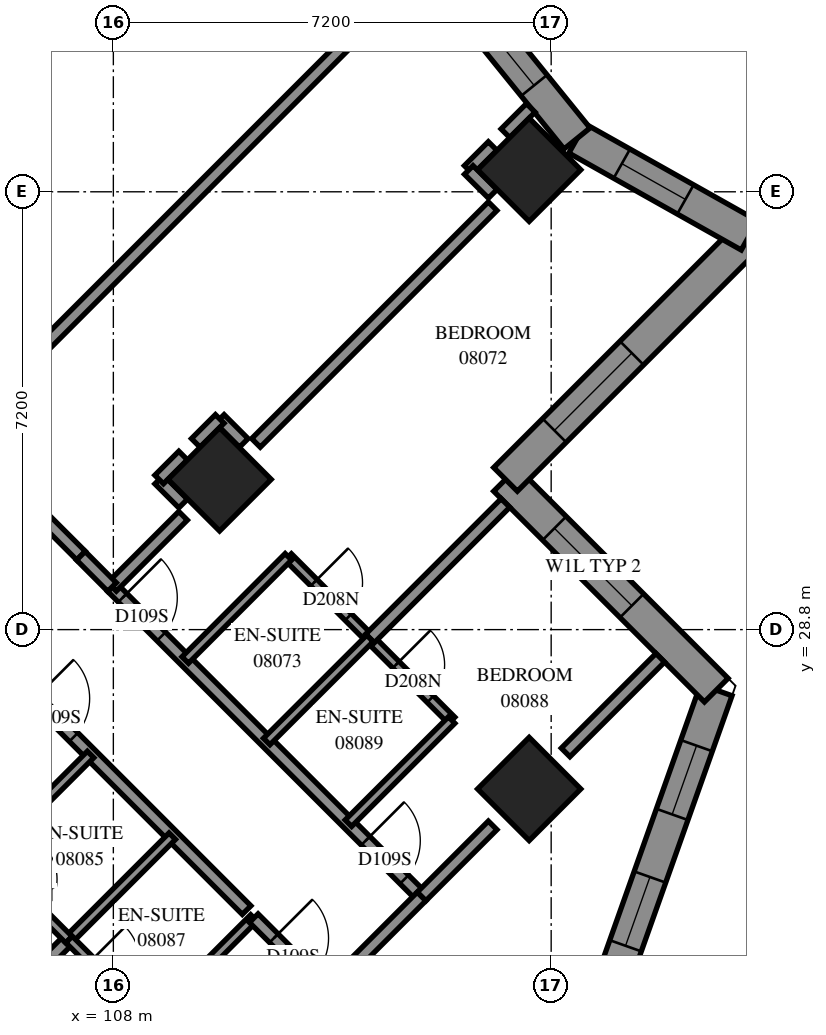
"""IFC4 building model, lengths in metres.
Left out: names, types, materials, properties, quantities, classifications, styles, units other than length and angle.
Written with IfcOpenShell. Run it as: python <this file> out.ifc"""

import sys

from ifc_helpers import new_model, si_unit, direction, frame, frame_2d, origin, origin_2d, place, context, subcontext, project, spatial, polyline, rectangle, outline, extrude, element, fill, save


model = new_model("IFC4")
c1 = context("Model", 3, precision=1e-05, world=origin(), true_north=direction((0.0, 1.0)))
c2 = subcontext(c1, "Body", "Model", "MODEL_VIEW")
j1 = project(units=[si_unit("LENGTHUNIT", "METRE"), si_unit("PLANEANGLEUNIT", "RADIAN")], contexts=[c1])
p1 = place(None, origin())
s1 = spatial("IfcSite", under=j1, at=p1, CompositionType="ELEMENT")
p2 = place(p1, origin())
s2 = spatial("IfcBuilding", under=s1, at=p2, CompositionType="ELEMENT")
p3 = place(p2, frame((0.0, 0.0, 33.8)))
s3 = spatial("IfcBuildingStorey", under=s2, at=p3, CompositionType="ELEMENT", Elevation=33.8)
for number, where, z_axis, x_axis in (
    (1, (114.838, 36.362, 0.0), (0.0, 0.0, 1.0), (0.707, -0.707, 0.0)),
    (2, (109.747, 31.271, 0.0), (0.0, 0.0, 1.0), (0.707, -0.707, 0.0)),
    (3, (114.838, 26.18, 0.0), (0.0, 0.0, 1.0), (0.707, -0.707, 0.0)),
):
    element("IfcColumn", number, at=place(p3, frame(where, z_axis=z_axis, x_axis=x_axis)), inside=s3, PredefinedType="COLUMN", context=c2, shape_type="SweptSolid", body=[
        extrude(rectangle(XDim=1.2, YDim=1.2, at=origin_2d()), origin(), (0.0, 0.0, 1.0), 3.1),
    ])
p4 = place(p3, frame((116.148, 22.826, 0.0), z_axis=(0.0, 0.0, 1.0), x_axis=(0.3344412968, 0.9424165846, 0.0)))
e4 = element("IfcWall", 4, at=p4, inside=s3, PredefinedType="SOLIDWALL", context=c2, shape_type="SweptSolid", body=[
    extrude(outline(polyline([(-0.125, -0.275), (5.457, -0.275), (5.11, 0.275), (0.125, 0.275), (-0.125, -0.275)])), origin(), (0.0, 0.0, 1.0), 3.1),
])
p5 = place(p4, frame((0.822, 0.0, 0.5)))
e5 = element("IfcOpeningElement", 5, at=p5, cuts=e4, PredefinedType="OPENING", context=c2, shape_type="SweptSolid", body=[
    extrude(rectangle(XDim=1.2, YDim=2.45, at=frame_2d((0.6, 1.225))), frame((0.0, 0.285, 0.0), z_axis=(0.0, -1.0, 0.0), x_axis=(1.0, 0.0, 0.0)), (0.0, 0.0, 1.0), 0.57),
])
p6 = place(p4, frame((3.115, 0.0, 0.5)))
e6 = element("IfcOpeningElement", 6, at=p6, cuts=e4, PredefinedType="OPENING", context=c2, shape_type="SweptSolid", body=[
    extrude(rectangle(XDim=1.2, YDim=2.45, at=frame_2d((0.6, 1.225))), frame((0.0, 0.285, 0.0), z_axis=(0.0, -1.0, 0.0), x_axis=(1.0, 0.0, 0.0)), (0.0, 0.0, 1.0), 0.57),
])
p7 = place(p3, frame((117.915, 27.805, 0.0), z_axis=(0.0, 0.0, 1.0), x_axis=(-0.7071067812, 0.7071067812, 0.0)))
e7 = element("IfcWall", 7, at=p7, inside=s3, PredefinedType="SOLIDWALL", context=c2, shape_type="SweptSolid", body=[
    extrude(outline(polyline([(-0.174, -0.275), (4.626, -0.275), (5.176, 0.275), (0.174, 0.275), (-0.174, -0.275)])), origin(), (0.0, 0.0, 1.0), 3.1),
])
p8 = place(p7, frame((1.964, 0.0, 0.6)))
e8 = element("IfcOpeningElement", 8, at=p8, cuts=e7, PredefinedType="OPENING", context=c2, shape_type="SweptSolid", body=[
    extrude(rectangle(XDim=1.8, YDim=1.9, at=frame_2d((0.9, 0.95))), frame((0.0, 0.285, 0.0), z_axis=(0.0, -1.0, 0.0), x_axis=(1.0, 0.0, 0.0)), (0.0, 0.0, 1.0), 0.57),
])
p9 = place(p3, frame((114.449, 31.271, 0.0), z_axis=(0.0, 0.0, 1.0), x_axis=(0.7070979682, 0.7071155941, 0.0)))
e9 = element("IfcWall", 9, at=p9, inside=s3, PredefinedType="SOLIDWALL", context=c2, shape_type="SweptSolid", body=[
    extrude(outline(polyline([(0.275, -0.275), (6.036, -0.275), (5.311, 0.275), (-0.275, 0.275), (0.275, -0.275)])), origin(), (0.0, 0.0, 1.0), 3.1),
])
p10 = place(p9, frame((1.137, 0.0, 0.6)))
e10 = element("IfcOpeningElement", 10, at=p10, cuts=e9, PredefinedType="OPENING", context=c2, shape_type="SweptSolid", body=[
    extrude(rectangle(XDim=1.8, YDim=1.9, at=frame_2d((0.9, 0.95))), frame((0.0, 0.285, 0.0), z_axis=(0.0, -1.0, 0.0), x_axis=(1.0, 0.0, 0.0)), (0.0, 0.0, 1.0), 0.57),
])
p11 = place(p3, frame((118.461, 35.282, 0.0), z_axis=(0.0, 0.0, 1.0), x_axis=(-0.8716297162, 0.4901649088, 0.0)))
e11 = element("IfcWall", 11, at=p11, inside=s3, PredefinedType="SOLIDWALL", context=c2, shape_type="SweptSolid", body=[
    extrude(outline(polyline([(-0.363, -0.275), (3.2, -0.275), (3.306, 0.275), (0.363, 0.275), (-0.363, -0.275)])), origin(), (0.0, 0.0, 1.0), 3.1),
])
p12 = place(p11, frame((1.208, 0.0, 0.5)))
e12 = element("IfcOpeningElement", 12, at=p12, cuts=e11, PredefinedType="OPENING", context=c2, shape_type="SweptSolid", body=[
    extrude(rectangle(XDim=1.2, YDim=2.45, at=frame_2d((0.6, 1.225))), frame((0.0, 0.285, 0.0), z_axis=(0.0, -1.0, 0.0), x_axis=(1.0, 0.0, 0.0)), (0.0, 0.0, 1.0), 0.57),
])
p13 = place(p3, frame((115.626, 36.877, 0.0), z_axis=(0.0, 0.0, 1.0), x_axis=(-0.6292379801, 0.7772126893, 0.0)))
e13 = element("IfcWall", 13, at=p13, inside=s3, PredefinedType="SOLIDWALL", context=c2, shape_type="SweptSolid", body=[
    extrude(outline(polyline([(0.053, -0.275), (3.502, -0.275), (3.445, 0.275), (-0.053, 0.275), (0.053, -0.275)])), origin(), (0.0, 0.0, 1.0), 3.1),
])
p14 = place(p13, frame((1.122, 0.0, 0.5)))
e14 = element("IfcOpeningElement", 14, at=p14, cuts=e13, PredefinedType="OPENING", context=c2, shape_type="SweptSolid", body=[
    extrude(rectangle(XDim=1.2, YDim=2.45, at=frame_2d((0.6, 1.225))), frame((0.0, 0.285, 0.0), z_axis=(0.0, -1.0, 0.0), x_axis=(1.0, 0.0, 0.0)), (0.0, 0.0, 1.0), 0.57),
])
p15 = place(p3, frame((102.609, 31.769, 0.0), z_axis=(0.0, 0.0, 1.0), x_axis=(0.7071067812, -0.7071067812, 0.0)))
e15 = element("IfcWall", 15, at=p15, inside=s3, PredefinedType="PARTITIONING", context=c2, shape_type="SweptSolid", body=[
    extrude(rectangle(XDim=10.723, YDim=0.2, at=frame_2d((5.361, 0.0))), origin(), (0.0, 0.0, 1.0), 3.1),
])
p16 = place(p15, frame((4.15, 0.0, 0.0)))
e16 = element("IfcOpeningElement", 16, at=p16, cuts=e15, PredefinedType="OPENING", context=c2, shape_type="SweptSolid", body=[
    extrude(rectangle(XDim=0.9, YDim=2.1, at=frame_2d((0.45, 1.05))), frame((0.0, 0.11, 0.0), z_axis=(0.0, -1.0, 0.0), x_axis=(1.0, 0.0, 0.0)), (0.0, 0.0, 1.0), 0.22),
])
p17 = place(p15, frame((5.8, 0.0, 0.0)))
e17 = element("IfcOpeningElement", 17, at=p17, cuts=e15, PredefinedType="OPENING", context=c2, shape_type="SweptSolid", body=[
    extrude(rectangle(XDim=0.9, YDim=2.1, at=frame_2d((0.45, 1.05))), frame((0.0, 0.11, 0.0), z_axis=(0.0, -1.0, 0.0), x_axis=(1.0, 0.0, 0.0)), (0.0, 0.0, 1.0), 0.22),
])
p18 = place(p3, frame((105.437, 32.045, 0.0), z_axis=(0.0, 0.0, 1.0), x_axis=(0.70701308, 0.70720047, 0.0)))
e18 = element("IfcWall", 18, at=p18, inside=s3, PredefinedType="PARTITIONING", context=c2, shape_type="SweptSolid", body=[
    extrude(rectangle(XDim=10.673, YDim=0.2, at=frame_2d((5.337, 0.0))), origin(), (0.0, 0.0, 1.0), 3.1),
])
p19 = place(p3, frame((101.587, 18.028, 0.0), z_axis=(0.0, 0.0, 1.0), x_axis=(0.7072374716, 0.7069760666, 0.0)))
e19 = element("IfcWall", 19, at=p19, inside=s3, PredefinedType="PARTITIONING", context=c2, shape_type="SweptSolid", body=[
    extrude(rectangle(XDim=8.034, YDim=0.2, at=frame_2d((4.017, 0.0))), origin(), (0.0, 0.0, 1.0), 3.1),
])
p20 = place(p3, frame((107.977, 29.499, 0.0), z_axis=(0.0, 0.0, 1.0), x_axis=(0.7071067812, -0.7071067812, 0.0)))
e20 = element("IfcWall", 20, at=p20, inside=s3, PredefinedType="PARTITIONING", context=c2, shape_type="SweptSolid", body=[
    extrude(rectangle(XDim=7.198, YDim=0.2, at=frame_2d((3.599, 0.0))), origin(), (0.0, 0.0, 1.0), 3.1),
])
p21 = place(p20, frame((0.247, 0.0, 0.0)))
e21 = element("IfcOpeningElement", 21, at=p21, cuts=e20, PredefinedType="OPENING", context=c2, shape_type="SweptSolid", body=[
    extrude(rectangle(XDim=0.9, YDim=2.1, at=frame_2d((0.45, 1.05))), frame((0.0, 0.11, 0.0), z_axis=(0.0, -1.0, 0.0), x_axis=(1.0, 0.0, 0.0)), (0.0, 0.0, 1.0), 0.22),
])
p22 = place(p20, frame((5.899, 0.0, 0.0)))
e22 = element("IfcOpeningElement", 22, at=p22, cuts=e20, PredefinedType="OPENING", context=c2, shape_type="SweptSolid", body=[
    extrude(rectangle(XDim=0.9, YDim=2.1, at=frame_2d((0.45, 1.05))), frame((0.0, 0.11, 0.0), z_axis=(0.0, -1.0, 0.0), x_axis=(1.0, 0.0, 0.0)), (0.0, 0.0, 1.0), 0.22),
])
p23 = place(p3, frame((110.345, 31.871, 0.0), z_axis=(0.0, 0.0, 1.0), x_axis=(0.7071067812, 0.7071067812, 0.0)))
e23 = element("IfcWall", 23, at=p23, inside=s3, PredefinedType="PARTITIONING", context=c2, shape_type="SweptSolid", body=[
    extrude(rectangle(XDim=5.504, YDim=0.2, at=frame_2d((2.752, 0.0))), origin(), (0.0, 0.0, 1.0), 3.1),
])
p24 = place(p3, frame((110.875, 29.995, 0.0), z_axis=(0.0, 0.0, 1.0), x_axis=(0.7071067812, -0.7071067812, 0.0)))
e24 = element("IfcWall", 24, at=p24, inside=s3, PredefinedType="PARTITIONING", context=c2, shape_type="SweptSolid", body=[
    extrude(rectangle(XDim=3.801, YDim=0.15, at=frame_2d((1.901, 0.0))), origin(), (0.0, 0.0, 1.0), 3.1),
])
p25 = place(p24, frame((0.598, 0.0, 0.0)))
e25 = element("IfcOpeningElement", 25, at=p25, cuts=e24, PredefinedType="OPENING", context=c2, shape_type="SweptSolid", body=[
    extrude(rectangle(XDim=0.8, YDim=2.1, at=frame_2d((0.4, 1.05))), frame((0.0, 0.085, 0.0), z_axis=(0.0, -1.0, 0.0), x_axis=(1.0, 0.0, 0.0)), (0.0, 0.0, 1.0), 0.17),
])
p26 = place(p24, frame((2.507, 0.0, 0.0)))
e26 = element("IfcOpeningElement", 26, at=p26, cuts=e24, PredefinedType="OPENING", context=c2, shape_type="SweptSolid", body=[
    extrude(rectangle(XDim=0.8, YDim=2.1, at=frame_2d((0.4, 1.05))), frame((0.0, 0.085, 0.0), z_axis=(0.0, -1.0, 0.0), x_axis=(1.0, 0.0, 0.0)), (0.0, 0.0, 1.0), 0.17),
])
p27 = place(p3, frame((112.221, 28.655, 0.0), z_axis=(0.0, 0.0, 1.0), x_axis=(0.7071067812, 0.7071067812, 0.0)))
e27 = element("IfcWall", 27, at=p27, inside=s3, PredefinedType="PARTITIONING", context=c2, shape_type="SweptSolid", body=[
    extrude(rectangle(XDim=3.15, YDim=0.2, at=frame_2d((1.575, 0.0))), origin(), (0.0, 0.0, 1.0), 3.1),
])
p28 = place(p3, frame((105.435, 32.049, 0.0), z_axis=(0.0, 0.0, 1.0), x_axis=(0.7074545101, -0.7067588812, 0.0)))
e28 = element("IfcWall", 28, at=p28, inside=s3, PredefinedType="PARTITIONING", context=c2, shape_type="SweptSolid", body=[
    extrude(rectangle(XDim=2.875, YDim=0.2, at=frame_2d((1.438, 0.0))), origin(), (0.0, 0.0, 1.0), 3.1),
])
for number, where, z_axis, x_axis in (
    (29, (105.927, 25.049, 0.0), (0.0, 0.0, 1.0), (0.707, 0.707, 0.0)),
    (30, (107.271, 23.705, 0.0), (0.0, 0.0, 1.0), (0.707, 0.707, 0.0)),
):
    element("IfcWall", number, at=place(p3, frame(where, z_axis=z_axis, x_axis=x_axis)), inside=s3, PredefinedType="PARTITIONING", context=c2, shape_type="SweptSolid", body=[
        extrude(rectangle(XDim=2.401, YDim=0.15, at=frame_2d((1.201, 0.0))), origin(), (0.0, 0.0, 1.0), 3.1),
    ])
for number, where, z_axis, x_axis in (
    (31, (109.182, 28.3, 0.0), (0.0, 0.0, 1.0), (0.707, 0.708, 0.0)),
    (32, (111.865, 25.616, 0.0), (0.0, 0.0, 1.0), (0.708, 0.707, 0.0)),
    (33, (110.522, 26.96, 0.0), (0.0, 0.0, 1.0), (0.708, 0.707, 0.0)),
):
    element("IfcWall", number, at=place(p3, frame(where, z_axis=z_axis, x_axis=x_axis)), inside=s3, PredefinedType="PARTITIONING", context=c2, shape_type="SweptSolid", body=[
        extrude(rectangle(XDim=2.4, YDim=0.15, at=frame_2d((1.2, 0.0))), origin(), (0.0, 0.0, 1.0), 3.1),
    ])
p29 = place(p3, frame((108.615, 22.363, 0.0), z_axis=(0.0, 0.0, 1.0), x_axis=(0.7071067812, 0.7071067812, 0.0)))
e34 = element("IfcWall", 34, at=p29, inside=s3, PredefinedType="PARTITIONING", context=c2, shape_type="SweptSolid", body=[
    extrude(rectangle(XDim=2.398, YDim=0.15, at=frame_2d((1.199, 0.0))), origin(), (0.0, 0.0, 1.0), 3.1),
])
p30 = place(p3, frame((111.513, 22.857, 0.0), z_axis=(0.0, 0.0, 1.0), x_axis=(0.7071067812, 0.7071067812, 0.0)))
e35 = element("IfcWall", 35, at=p30, inside=s3, PredefinedType="PARTITIONING", context=c2, shape_type="SweptSolid", body=[
    extrude(rectangle(XDim=2.2, YDim=0.2, at=frame_2d((1.1, 0.0))), origin(), (0.0, 0.0, 1.0), 2.6),
])
p31 = place(p3, frame((115.438, 26.78, 0.0), z_axis=(0.0, 0.0, 1.0), x_axis=(0.7071067812, 0.7071067812, 0.0)))
e36 = element("IfcWall", 36, at=p31, inside=s3, PredefinedType="PARTITIONING", context=c2, shape_type="SweptSolid", body=[
    extrude(rectangle(XDim=2.201, YDim=0.2, at=frame_2d((1.101, 0.0))), origin(), (0.0, 0.0, 1.0), 3.1),
])
p32 = place(p3, frame((105.925, 25.045, 0.0), z_axis=(0.0, 0.0, 1.0), x_axis=(0.7071067812, -0.7071067812, 0.0)))
e37 = element("IfcWall", 37, at=p32, inside=s3, PredefinedType="PARTITIONING", context=c2, shape_type="SweptSolid", body=[
    extrude(rectangle(XDim=1.901, YDim=0.15, at=frame_2d((0.95, 0.0))), origin(), (0.0, 0.0, 1.0), 3.1),
])
p33 = place(p32, frame((0.493, 0.0, 0.0)))
e38 = element("IfcOpeningElement", 38, at=p33, cuts=e37, PredefinedType="OPENING", context=c2, shape_type="SweptSolid", body=[
    extrude(rectangle(XDim=0.8, YDim=2.1, at=frame_2d((0.4, 1.05))), frame((0.0, 0.085, 0.0), z_axis=(0.0, -1.0, 0.0), x_axis=(1.0, 0.0, 0.0)), (0.0, 0.0, 1.0), 0.17),
])
p34 = place(p3, frame((107.272, 23.704, 0.0), z_axis=(0.0, 0.0, 1.0), x_axis=(0.7076330979, -0.7065800724, 0.0)))
e39 = element("IfcWall", 39, at=p34, inside=s3, PredefinedType="PARTITIONING", context=c2, shape_type="SweptSolid", body=[
    extrude(rectangle(XDim=1.899, YDim=0.15, at=frame_2d((0.95, 0.0))), origin(), (0.0, 0.0, 1.0), 3.1),
])
p35 = place(p34, frame((0.503, 0.0, 0.0)))
e40 = element("IfcOpeningElement", 40, at=p35, cuts=e39, PredefinedType="OPENING", context=c2, shape_type="SweptSolid", body=[
    extrude(rectangle(XDim=0.8, YDim=2.1, at=frame_2d((0.4, 1.05))), frame((0.0, 0.085, 0.0), z_axis=(0.0, -1.0, 0.0), x_axis=(1.0, 0.0, 0.0)), (0.0, 0.0, 1.0), 0.17),
])
p36 = place(p3, frame((110.309, 24.055, 0.0), z_axis=(0.0, 0.0, 1.0), x_axis=(0.7071067812, -0.7071067812, 0.0)))
e41 = element("IfcWall", 41, at=p36, inside=s3, PredefinedType="PARTITIONING", context=c2, shape_type="SweptSolid", body=[
    extrude(rectangle(XDim=1.7, YDim=0.2, at=frame_2d((0.85, 0.0))), origin(), (0.0, 0.0, 1.0), 3.1),
])
p37 = place(p36, frame((0.467, 0.0, 0.0)))
e42 = element("IfcOpeningElement", 42, at=p37, cuts=e41, PredefinedType="OPENING", context=c2, shape_type="SweptSolid", body=[
    extrude(rectangle(XDim=0.9, YDim=2.1, at=frame_2d((0.45, 1.05))), frame((0.0, 0.11, 0.0), z_axis=(0.0, -1.0, 0.0), x_axis=(1.0, 0.0, 0.0)), (0.0, 0.0, 1.0), 0.22),
])
p38 = place(p3, frame((113.07, 24.413, 0.0), z_axis=(0.0, 0.0, 1.0), x_axis=(0.7071067812, 0.7071067812, 0.0)))
e43 = element("IfcWall", 43, at=p38, inside=s3, PredefinedType="PARTITIONING", context=c2, shape_type="SweptSolid", body=[
    extrude(rectangle(XDim=1.652, YDim=0.2, at=frame_2d((0.826, 0.0))), origin(), (0.0, 0.0, 1.0), 2.6),
])
p39 = place(p3, frame((107.978, 29.504, 0.0), z_axis=(0.0, 0.0, 1.0), x_axis=(0.7071067812, 0.7071067812, 0.0)))
e44 = element("IfcWall", 44, at=p39, inside=s3, PredefinedType="PARTITIONING", context=c2, shape_type="SweptSolid", body=[
    extrude(rectangle(XDim=1.652, YDim=0.2, at=frame_2d((0.826, 0.0))), origin(), (0.0, 0.0, 1.0), 3.1),
])
p40 = place(p3, frame((107.466, 30.014, 0.0), z_axis=(0.0, 0.0, 1.0), x_axis=(0.7057270646, -0.7084838109, 0.0)))
e45 = element("IfcWall", 45, at=p40, inside=s3, PredefinedType="PARTITIONING", context=c2, shape_type="SweptSolid", body=[
    extrude(rectangle(XDim=0.726, YDim=0.2, at=frame_2d((0.363, 0.0))), origin(), (0.0, 0.0, 1.0), 3.1),
])
for number, where, z_axis, x_axis in (
    (46, (113.843, 36.359, 0.0), (0.0, 0.0, 1.0), (0.707, 0.707, 0.0)),
    (47, (108.754, 31.268, 0.0), (0.0, 0.0, 1.0), (0.707, -0.707, 0.0)),
    (48, (109.751, 32.265, 0.0), (0.0, 0.0, 1.0), (0.707, -0.707, 0.0)),
    (49, (109.355, 31.871, 0.0), (0.0, 0.0, 1.0), (0.707, 0.707, 0.0)),
    (50, (108.753, 31.269, 0.0), (0.0, 0.0, 1.0), (0.707, 0.707, 0.0)),
):
    element("IfcWall", number, at=place(p3, frame(where, z_axis=z_axis, x_axis=x_axis)), inside=s3, PredefinedType="PARTITIONING", context=c2, shape_type="SweptSolid", body=[
        extrude(rectangle(XDim=0.557, YDim=0.2, at=frame_2d((0.279, 0.0))), origin(), (0.0, 0.0, 1.0), 3.1),
    ])
p41 = place(p3, frame((113.845, 36.359, 0.0), z_axis=(0.0, 0.0, 1.0), x_axis=(0.7089037401, -0.705305244, 0.0)))
e51 = element("IfcWall", 51, at=p41, inside=s3, PredefinedType="PARTITIONING", context=c2, shape_type="SweptSolid", body=[
    extrude(rectangle(XDim=0.556, YDim=0.2, at=frame_2d((0.278, 0.0))), origin(), (0.0, 0.0, 1.0), 3.1),
])
p42 = place(p3, frame((114.447, 36.963, 0.0), z_axis=(0.0, 0.0, 1.0), x_axis=(0.7070220419, 0.7071915103, 0.0)))
e52 = element("IfcWall", 52, at=p42, inside=s3, PredefinedType="PARTITIONING", context=c2, shape_type="SweptSolid", body=[
    extrude(rectangle(XDim=0.59, YDim=0.2, at=frame_2d((0.295, 0.0))), origin(), (0.0, 0.0, 1.0), 3.1),
])
p43 = place(p5, origin())
e53 = element("IfcWindow", 53, at=p43, inside=s3, PartitioningType="SINGLE_PANEL", PredefinedType="WINDOW", context=c2, shape_type="SweptSolid", body=[
    extrude(rectangle(XDim=1.2, YDim=2.45, at=frame_2d((0.6, 1.225))), frame((0.0, 0.155, 0.0), z_axis=(0.0, -1.0, 0.0), x_axis=(1.0, 0.0, 0.0)), (0.0, 0.0, 1.0), 0.06),
])
fill(e5, e53)
p44 = place(p6, origin())
e54 = element("IfcWindow", 54, at=p44, inside=s3, PartitioningType="SINGLE_PANEL", PredefinedType="WINDOW", context=c2, shape_type="SweptSolid", body=[
    extrude(rectangle(XDim=1.2, YDim=2.45, at=frame_2d((0.6, 1.225))), frame((0.0, 0.155, 0.0), z_axis=(0.0, -1.0, 0.0), x_axis=(1.0, 0.0, 0.0)), (0.0, 0.0, 1.0), 0.06),
])
fill(e6, e54)
p45 = place(p8, origin())
e55 = element("IfcWindow", 55, at=p45, inside=s3, PartitioningType="SINGLE_PANEL", PredefinedType="WINDOW", context=c2, shape_type="SweptSolid", body=[
    extrude(rectangle(XDim=1.8, YDim=1.9, at=frame_2d((0.9, 0.95))), frame((0.0, 0.155, 0.0), z_axis=(0.0, -1.0, 0.0), x_axis=(1.0, 0.0, 0.0)), (0.0, 0.0, 1.0), 0.06),
])
fill(e8, e55)
p46 = place(p10, origin())
e56 = element("IfcWindow", 56, at=p46, inside=s3, PartitioningType="SINGLE_PANEL", PredefinedType="WINDOW", context=c2, shape_type="SweptSolid", body=[
    extrude(rectangle(XDim=1.8, YDim=1.9, at=frame_2d((0.9, 0.95))), frame((0.0, 0.155, 0.0), z_axis=(0.0, -1.0, 0.0), x_axis=(1.0, 0.0, 0.0)), (0.0, 0.0, 1.0), 0.06),
])
fill(e10, e56)
p47 = place(p12, origin())
e57 = element("IfcWindow", 57, at=p47, inside=s3, PartitioningType="SINGLE_PANEL", PredefinedType="WINDOW", context=c2, shape_type="SweptSolid", body=[
    extrude(rectangle(XDim=1.2, YDim=2.45, at=frame_2d((0.6, 1.225))), frame((0.0, 0.155, 0.0), z_axis=(0.0, -1.0, 0.0), x_axis=(1.0, 0.0, 0.0)), (0.0, 0.0, 1.0), 0.06),
])
fill(e12, e57)
p48 = place(p14, origin())
e58 = element("IfcWindow", 58, at=p48, inside=s3, PartitioningType="SINGLE_PANEL", PredefinedType="WINDOW", context=c2, shape_type="SweptSolid", body=[
    extrude(rectangle(XDim=1.2, YDim=2.45, at=frame_2d((0.6, 1.225))), frame((0.0, 0.155, 0.0), z_axis=(0.0, -1.0, 0.0), x_axis=(1.0, 0.0, 0.0)), (0.0, 0.0, 1.0), 0.06),
])
fill(e14, e58)
p49 = place(p21, origin())
e59 = element("IfcDoor", 59, at=p49, inside=s3, OperationType="SINGLE_SWING_LEFT", PredefinedType="DOOR", context=c2, shape_type="SweptSolid", body=[
    extrude(rectangle(XDim=0.9, YDim=2.1, at=frame_2d((0.45, 1.05))), frame((0.0, 0.025, 0.0), z_axis=(0.0, -1.0, 0.0), x_axis=(1.0, 0.0, 0.0)), (0.0, 0.0, 1.0), 0.05),
])
fill(e21, e59)
p50 = place(p25, origin())
e60 = element("IfcDoor", 60, at=p50, inside=s3, OperationType="SINGLE_SWING_RIGHT", PredefinedType="DOOR", context=c2, shape_type="SweptSolid", body=[
    extrude(rectangle(XDim=0.8, YDim=2.1, at=frame_2d((0.4, 1.05))), frame((0.0, 0.025, 0.0), z_axis=(0.0, -1.0, 0.0), x_axis=(1.0, 0.0, 0.0)), (0.0, 0.0, 1.0), 0.05),
])
fill(e25, e60)
p51 = place(p17, origin())
e61 = element("IfcDoor", 61, at=p51, inside=s3, OperationType="SINGLE_SWING_RIGHT", PredefinedType="DOOR", context=c2, shape_type="SweptSolid", body=[
    extrude(rectangle(XDim=0.9, YDim=2.1, at=frame_2d((0.45, 1.05))), frame((0.0, 0.025, 0.0), z_axis=(0.0, -1.0, 0.0), x_axis=(1.0, 0.0, 0.0)), (0.0, 0.0, 1.0), 0.05),
])
fill(e17, e61)
p52 = place(p37, origin())
e62 = element("IfcDoor", 62, at=p52, inside=s3, OperationType="SINGLE_SWING_LEFT", PredefinedType="DOOR", context=c2, shape_type="SweptSolid", body=[
    extrude(rectangle(XDim=0.9, YDim=2.1, at=frame_2d((0.45, 1.05))), frame((0.0, 0.025, 0.0), z_axis=(0.0, -1.0, 0.0), x_axis=(1.0, 0.0, 0.0)), (0.0, 0.0, 1.0), 0.05),
])
fill(e42, e62)
p53 = place(p22, origin())
e63 = element("IfcDoor", 63, at=p53, inside=s3, OperationType="SINGLE_SWING_RIGHT", PredefinedType="DOOR", context=c2, shape_type="SweptSolid", body=[
    extrude(rectangle(XDim=0.9, YDim=2.1, at=frame_2d((0.45, 1.05))), frame((0.0, 0.025, 0.0), z_axis=(0.0, -1.0, 0.0), x_axis=(1.0, 0.0, 0.0)), (0.0, 0.0, 1.0), 0.05),
])
fill(e22, e63)
p54 = place(p26, origin())
e64 = element("IfcDoor", 64, at=p54, inside=s3, OperationType="SINGLE_SWING_RIGHT", PredefinedType="DOOR", context=c2, shape_type="SweptSolid", body=[
    extrude(rectangle(XDim=0.8, YDim=2.1, at=frame_2d((0.4, 1.05))), frame((0.0, 0.025, 0.0), z_axis=(0.0, -1.0, 0.0), x_axis=(1.0, 0.0, 0.0)), (0.0, 0.0, 1.0), 0.05),
])
fill(e26, e64)
save(model, sys.argv[1])
